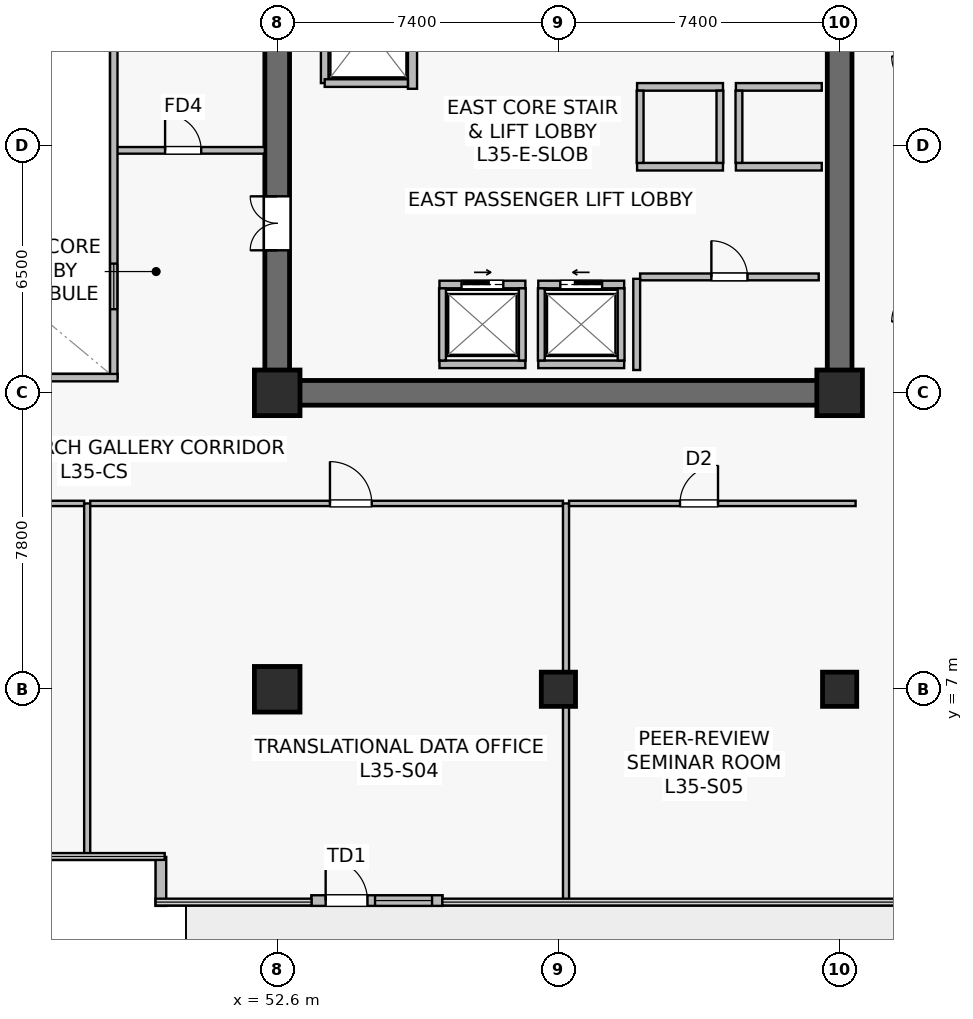
"""IFC4 building model, lengths in metres.
Left out: names, types, materials, properties, quantities, classifications, styles, units other than length and angle.
Written with IfcOpenShell. Run it as: python <this file> out.ifc"""

import sys

from ifc_helpers import new_model, si_unit, direction, frame, frame_2d, origin, origin_2d, place, context, subcontext, project, spatial, rectangle, extrude, source, transform, mapped, element, fill, save


model = new_model("IFC4")
c1 = context("Model", 3, precision=1e-05, world=origin(), true_north=direction((0.0, 1.0)))
c2 = subcontext(c1, "Body", "Model", "MODEL_VIEW")
j1 = project(units=[si_unit("LENGTHUNIT", "METRE"), si_unit("PLANEANGLEUNIT", "RADIAN")], contexts=[c1])
p1 = place(None, origin())
s1 = spatial("IfcSite", under=j1, at=p1, CompositionType="ELEMENT")
p2 = place(p1, origin())
s2 = spatial("IfcBuilding", under=s1, at=p2, CompositionType="ELEMENT")
p3 = place(p2, frame((0.0, 0.0, 146.1)))
s3 = spatial("IfcBuildingStorey", under=s2, at=p3, CompositionType="ELEMENT", Elevation=146.1)
p4 = place(p3, frame((52.275, 14.8, 0.0), z_axis=(0.0, 0.0, 1.0), x_axis=(1.0, 0.0, 0.0)))
e1 = element("IfcWall", 1, at=p4, inside=s3, PredefinedType="SHEAR", context=c2, shape_type="SweptSolid", body=[
    extrude(rectangle(XDim=15.45, YDim=0.65, at=frame_2d((7.725, 0.0))), origin(), (0.0, 0.0, 1.0), 3.79),
])
p5 = place(p3, frame((52.6, 15.125, 0.0), z_axis=(0.0, 0.0, 1.0), x_axis=(0.0, 1.0, 0.0)))
e2 = element("IfcWall", 2, at=p5, inside=s3, PredefinedType="SHEAR", context=c2, shape_type="SweptSolid", body=[
    extrude(rectangle(XDim=18.35, YDim=0.65, at=frame_2d((9.175, 0.0))), origin(), (0.0, 0.0, 1.0), 3.79),
])
p6 = place(p5, frame((3.425, 0.0, 0.0)))
e3 = element("IfcOpeningElement", 3, at=p6, cuts=e2, PredefinedType="OPENING", context=c2, shape_type="SweptSolid", body=[
    extrude(rectangle(XDim=1.42, YDim=2.2, at=frame_2d((0.71, 1.1))), frame((0.0, 0.335, 0.0), z_axis=(0.0, -1.0, 0.0), x_axis=(1.0, 0.0, 0.0)), (0.0, 0.0, 1.0), 0.67),
])
p7 = place(p3, frame((67.4, 15.125, 0.0), z_axis=(0.0, 0.0, 1.0), x_axis=(0.0, 1.0, 0.0)))
e4 = element("IfcWall", 4, at=p7, inside=s3, PredefinedType="SHEAR", context=c2, shape_type="SweptSolid", body=[
    extrude(rectangle(XDim=18.35, YDim=0.65, at=frame_2d((9.175, 0.0))), origin(), (0.0, 0.0, 1.0), 3.79),
])
m1 = source(origin(), c2, "Body", "SweptSolid", [
    extrude(rectangle(XDim=1.2, YDim=1.2, at=origin_2d()), origin(), (0.0, 0.0, 1.0), 4.1),
])
p8 = place(p3, frame((52.6, 7.0, 0.0), z_axis=(0.0, 0.0, 1.0), x_axis=(1.0, 0.0, 0.0)))
e5 = element("IfcColumn", 5, at=p8, inside=s3, PredefinedType="COLUMN", context=c2, shape_type="MappedRepresentation", body=[
    mapped(m1, transform((0.0, 0.0, 0.0), scale=1.0)),
])
m2 = source(origin(), c2, "Body", "SweptSolid", [
    extrude(rectangle(XDim=0.9, YDim=0.9, at=origin_2d()), origin(), (0.0, 0.0, 1.0), 4.1),
])
p9 = place(p3, frame((60.0, 7.0, 0.0), z_axis=(0.0, 0.0, 1.0), x_axis=(1.0, 0.0, 0.0)))
e6 = element("IfcColumn", 6, at=p9, inside=s3, PredefinedType="COLUMN", context=c2, shape_type="MappedRepresentation", body=[
    mapped(m2, transform((0.0, 0.0, 0.0), scale=1.0)),
])
for number, where, z_axis, x_axis in (
    (7, (52.6, 14.8, 0.0), (0.0, 0.0, 1.0), (1.0, 0.0, 0.0)),
    (8, (67.4, 14.8, 0.0), (0.0, 0.0, 1.0), (1.0, 0.0, 0.0)),
):
    element("IfcColumn", number, at=place(p3, frame(where, z_axis=z_axis, x_axis=x_axis)), inside=s3, PredefinedType="COLUMN", context=c2, shape_type="MappedRepresentation", body=[
        mapped(m1, transform((0.0, 0.0, 0.0), scale=1.0)),
    ])
p10 = place(p3, frame((67.4, 7.0, 0.0), z_axis=(0.0, 0.0, 1.0), x_axis=(1.0, 0.0, 0.0)))
e9 = element("IfcColumn", 9, at=p10, inside=s3, PredefinedType="COLUMN", context=c2, shape_type="MappedRepresentation", body=[
    mapped(m2, transform((0.0, 0.0, 0.0), scale=1.0)),
])
p11 = place(p3, frame((53.497, 1.44, 0.0), z_axis=(0.0, 0.0, 1.0), x_axis=(1.0, 0.0, 0.0)))
e10 = element("IfcWall", 10, at=p11, inside=s3, PredefinedType="STANDARD", context=c2, shape_type="SweptSolid", body=[
    extrude(rectangle(XDim=3.456, YDim=0.28, at=frame_2d((1.728, 0.0))), origin(), (0.0, 0.0, 1.0), 3.79),
])
p12 = place(p11, frame((0.378, 0.0, 0.0)))
e11 = element("IfcOpeningElement", 11, at=p12, cuts=e10, PredefinedType="OPENING", context=c2, shape_type="SweptSolid", body=[
    extrude(rectangle(XDim=1.1, YDim=2.2, at=frame_2d((0.55, 1.1))), frame((0.0, 0.15, 0.0), z_axis=(0.0, -1.0, 0.0), x_axis=(1.0, 0.0, 0.0)), (0.0, 0.0, 1.0), 0.3),
])
p13 = place(p11, frame((1.678, 0.0, 0.9)))
e12 = element("IfcOpeningElement", 12, at=p13, cuts=e10, PredefinedType="OPENING", context=c2, shape_type="SweptSolid", body=[
    extrude(rectangle(XDim=1.5, YDim=2.2, at=frame_2d((0.75, 1.1))), frame((0.0, 0.15, 0.0), z_axis=(0.0, -1.0, 0.0), x_axis=(1.0, 0.0, 0.0)), (0.0, 0.0, 1.0), 0.3),
])
p14 = place(p3, frame((49.54, 2.588, 0.0), z_axis=(0.0, 0.0, 1.0), x_axis=(0.0, -1.0, 0.0)))
e13 = element("IfcWall", 13, at=p14, inside=s3, PredefinedType="STANDARD", context=c2, shape_type="SweptSolid", body=[
    extrude(rectangle(XDim=1.288, YDim=0.28, at=frame_2d((0.644, 0.0))), origin(), (0.0, 0.0, 1.0), 3.79),
])
p15 = place(p3, frame((56.16, 22.8, 0.0), z_axis=(0.0, 0.0, 1.0), x_axis=(0.0, 1.0, 0.0)))
e14 = element("IfcWall", 14, at=p15, inside=s3, PredefinedType="SOLIDWALL", context=c2, shape_type="SweptSolid", body=[
    extrude(rectangle(XDim=6.85, YDim=0.24, at=frame_2d((3.425, 0.0))), origin(), (0.0, 0.0, 1.0), 2.875),
])
p16 = place(p15, frame((4.85, 0.0, 0.0)))
e15 = element("IfcOpeningElement", 15, at=p16, cuts=e14, PredefinedType="OPENING", context=c2, shape_type="SweptSolid", body=[
    extrude(rectangle(XDim=1.1, YDim=2.22, at=frame_2d((0.55, 1.11))), frame((0.0, 0.13, 0.0), z_axis=(0.0, -1.0, 0.0), x_axis=(1.0, 0.0, 0.0)), (0.0, 0.0, 1.0), 0.26),
])
p17 = place(p15, frame((1.0, 0.0, 0.0)))
e16 = element("IfcOpeningElement", 16, at=p17, cuts=e14, PredefinedType="OPENING", context=c2, shape_type="SweptSolid", body=[
    extrude(rectangle(XDim=1.2, YDim=2.22, at=frame_2d((0.6, 1.11))), frame((0.0, 0.13, 0.0), z_axis=(0.0, -1.0, 0.0), x_axis=(1.0, 0.0, 0.0)), (0.0, 0.0, 1.0), 0.26),
])
p18 = place(p3, frame((59.47, 17.65, 0.0), z_axis=(0.0, 0.0, 1.0), x_axis=(1.0, 0.0, 0.0)))
e17 = element("IfcWall", 17, at=p18, inside=s3, PredefinedType="SOLIDWALL", context=c2, shape_type="SweptSolid", body=[
    extrude(rectangle(XDim=2.26, YDim=0.2, at=frame_2d((1.13, 0.0))), origin(), (0.0, 0.0, 1.0), 3.125),
])
p19 = place(p18, frame((0.58, 0.0, 0.0)))
e18 = element("IfcOpeningElement", 18, at=p19, cuts=e17, PredefinedType="OPENING", context=c2, shape_type="SweptSolid", body=[
    extrude(rectangle(XDim=1.1, YDim=2.22, at=frame_2d((0.55, 1.11))), frame((0.0, 0.11, 0.0), z_axis=(0.0, -1.0, 0.0), x_axis=(1.0, 0.0, 0.0)), (0.0, 0.0, 1.0), 0.22),
])
p20 = place(p3, frame((59.47, 15.55, 0.0), z_axis=(0.0, 0.0, 1.0), x_axis=(1.0, 0.0, 0.0)))
e19 = element("IfcWall", 19, at=p20, inside=s3, PredefinedType="SOLIDWALL", context=c2, shape_type="SweptSolid", body=[
    extrude(rectangle(XDim=2.26, YDim=0.2, at=frame_2d((1.13, 0.0))), origin(), (0.0, 0.0, 1.0), 3.125),
])
for number, where, z_axis, x_axis in (
    (20, (59.55, 15.65, 0.0), (0.0, 0.0, 1.0), (0.0, 1.0, 0.0)),
    (21, (61.65, 15.65, 0.0), (0.0, 0.0, 1.0), (0.0, 1.0, 0.0)),
):
    element("IfcWall", number, at=place(p3, frame(where, z_axis=z_axis, x_axis=x_axis)), inside=s3, PredefinedType="SOLIDWALL", context=c2, shape_type="SweptSolid", body=[
        extrude(rectangle(XDim=1.9, YDim=0.18, at=frame_2d((0.95, 0.0))), origin(), (0.0, 0.0, 1.0), 3.79),
    ])
p21 = place(p3, frame((56.87, 17.65, 0.0), z_axis=(0.0, 0.0, 1.0), x_axis=(1.0, 0.0, 0.0)))
e22 = element("IfcWall", 22, at=p21, inside=s3, PredefinedType="SOLIDWALL", context=c2, shape_type="SweptSolid", body=[
    extrude(rectangle(XDim=2.26, YDim=0.2, at=frame_2d((1.13, 0.0))), origin(), (0.0, 0.0, 1.0), 3.79),
])
p22 = place(p21, frame((0.58, 0.0, 0.0)))
e23 = element("IfcOpeningElement", 23, at=p22, cuts=e22, PredefinedType="OPENING", context=c2, shape_type="SweptSolid", body=[
    extrude(rectangle(XDim=1.1, YDim=2.22, at=frame_2d((0.55, 1.11))), frame((0.0, 0.11, 0.0), z_axis=(0.0, -1.0, 0.0), x_axis=(1.0, 0.0, 0.0)), (0.0, 0.0, 1.0), 0.22),
])
p23 = place(p3, frame((56.87, 15.55, 0.0), z_axis=(0.0, 0.0, 1.0), x_axis=(1.0, 0.0, 0.0)))
e24 = element("IfcWall", 24, at=p23, inside=s3, PredefinedType="SOLIDWALL", context=c2, shape_type="SweptSolid", body=[
    extrude(rectangle(XDim=2.26, YDim=0.2, at=frame_2d((1.13, 0.0))), origin(), (0.0, 0.0, 1.0), 3.79),
])
for number, where, z_axis, x_axis in (
    (25, (56.95, 15.65, 0.0), (0.0, 0.0, 1.0), (0.0, 1.0, 0.0)),
    (26, (59.05, 15.65, 0.0), (0.0, 0.0, 1.0), (0.0, 1.0, 0.0)),
):
    element("IfcWall", number, at=place(p3, frame(where, z_axis=z_axis, x_axis=x_axis)), inside=s3, PredefinedType="SOLIDWALL", context=c2, shape_type="SweptSolid", body=[
        extrude(rectangle(XDim=1.9, YDim=0.18, at=frame_2d((0.95, 0.0))), origin(), (0.0, 0.0, 1.0), 3.79),
    ])
for number, where, z_axis, x_axis in (
    (27, (64.67, 20.75, 0.0), (0.0, 0.0, 1.0), (1.0, 0.0, 0.0)),
    (28, (64.67, 22.85, 0.0), (0.0, 0.0, 1.0), (1.0, 0.0, 0.0)),
):
    element("IfcWall", number, at=place(p3, frame(where, z_axis=z_axis, x_axis=x_axis)), inside=s3, PredefinedType="SOLIDWALL", context=c2, shape_type="SweptSolid", body=[
        extrude(rectangle(XDim=2.26, YDim=0.2, at=frame_2d((1.13, 0.0))), origin(), (0.0, 0.0, 1.0), 3.79),
    ])
p24 = place(p3, frame((64.75, 20.85, 0.0), z_axis=(0.0, 0.0, 1.0), x_axis=(0.0, 1.0, 0.0)))
e29 = element("IfcWall", 29, at=p24, inside=s3, PredefinedType="SOLIDWALL", context=c2, shape_type="SweptSolid", body=[
    extrude(rectangle(XDim=1.9, YDim=0.18, at=frame_2d((0.95, 0.0))), origin(), (0.0, 0.0, 1.0), 3.79),
])
for number, where, z_axis, x_axis in (
    (30, (62.07, 20.75, 0.0), (0.0, 0.0, 1.0), (1.0, 0.0, 0.0)),
    (31, (62.07, 22.85, 0.0), (0.0, 0.0, 1.0), (1.0, 0.0, 0.0)),
):
    element("IfcWall", number, at=place(p3, frame(where, z_axis=z_axis, x_axis=x_axis)), inside=s3, PredefinedType="SOLIDWALL", context=c2, shape_type="SweptSolid", body=[
        extrude(rectangle(XDim=2.26, YDim=0.2, at=frame_2d((1.13, 0.0))), origin(), (0.0, 0.0, 1.0), 3.79),
    ])
for number, where, z_axis, x_axis in (
    (32, (62.15, 20.85, 0.0), (0.0, 0.0, 1.0), (0.0, 1.0, 0.0)),
    (33, (64.25, 20.85, 0.0), (0.0, 0.0, 1.0), (0.0, 1.0, 0.0)),
):
    element("IfcWall", number, at=place(p3, frame(where, z_axis=z_axis, x_axis=x_axis)), inside=s3, PredefinedType="SOLIDWALL", context=c2, shape_type="SweptSolid", body=[
        extrude(rectangle(XDim=1.9, YDim=0.18, at=frame_2d((0.95, 0.0))), origin(), (0.0, 0.0, 1.0), 3.79),
    ])
p25 = place(p3, frame((53.85, 22.95, 0.0), z_axis=(0.0, 0.0, 1.0), x_axis=(0.0, 1.0, 0.0)))
e34 = element("IfcWall", 34, at=p25, inside=s3, PredefinedType="SOLIDWALL", context=c2, shape_type="SweptSolid", body=[
    extrude(rectangle(XDim=2.9, YDim=0.2, at=frame_2d((1.45, 0.0))), origin(), (0.0, 0.0, 1.0), 2.875),
])
p26 = place(p3, frame((53.85, 22.95, 0.0), z_axis=(0.0, 0.0, 1.0), x_axis=(1.0, 0.0, 0.0)))
e35 = element("IfcWall", 35, at=p26, inside=s3, PredefinedType="SOLIDWALL", context=c2, shape_type="SweptSolid", body=[
    extrude(rectangle(XDim=2.19, YDim=0.2, at=frame_2d((1.095, 0.0))), origin(), (0.0, 0.0, 1.0), 3.79),
])
p27 = place(p3, frame((62.15, 17.85, 0.0), z_axis=(0.0, 0.0, 1.0), x_axis=(1.0, 0.0, 0.0)))
e36 = element("IfcWall", 36, at=p27, inside=s3, PredefinedType="SOLIDWALL", context=c2, shape_type="SweptSolid", body=[
    extrude(rectangle(XDim=4.7, YDim=0.18, at=frame_2d((2.35, 0.0))), origin(), (0.0, 0.0, 1.0), 3.79),
])
p28 = place(p27, frame((1.875, 0.0, 0.0)))
e37 = element("IfcOpeningElement", 37, at=p28, cuts=e36, PredefinedType="OPENING", context=c2, shape_type="SweptSolid", body=[
    extrude(rectangle(XDim=0.95, YDim=2.15, at=frame_2d((0.475, 1.075))), frame((0.0, 0.1, 0.0), z_axis=(0.0, -1.0, 0.0), x_axis=(1.0, 0.0, 0.0)), (0.0, 0.0, 1.0), 0.2),
])
p29 = place(p3, frame((62.06, 15.4, 0.0), z_axis=(0.0, 0.0, 1.0), x_axis=(0.0, 1.0, 0.0)))
e38 = element("IfcWall", 38, at=p29, inside=s3, PredefinedType="SOLIDWALL", context=c2, shape_type="SweptSolid", body=[
    extrude(rectangle(XDim=2.4, YDim=0.18, at=frame_2d((1.2, 0.0))), origin(), (0.0, 0.0, 1.0), 3.79),
])
p30 = place(p3, frame((48.3, 21.18, 0.0), z_axis=(0.0, 0.0, 1.0), x_axis=(1.0, 0.0, 0.0)))
e39 = element("IfcWall", 39, at=p30, inside=s3, PredefinedType="PARTITIONING", context=c2, shape_type="SweptSolid", body=[
    extrude(rectangle(XDim=3.975, YDim=0.175, at=frame_2d((1.987, 0.0))), origin(), (0.0, 0.0, 1.0), 3.79),
])
p31 = place(p30, frame((1.35, 0.0, 0.0)))
e40 = element("IfcOpeningElement", 40, at=p31, cuts=e39, PredefinedType="OPENING", context=c2, shape_type="SweptSolid", body=[
    extrude(rectangle(XDim=0.95, YDim=2.15, at=frame_2d((0.475, 1.075))), frame((0.0, 0.098, 0.0), z_axis=(0.0, -1.0, 0.0), x_axis=(1.0, 0.0, 0.0)), (0.0, 0.0, 1.0), 0.195),
])
p32 = place(p3, frame((48.3, 15.2, 0.0), z_axis=(0.0, 0.0, 1.0), x_axis=(0.0, 1.0, 0.0)))
e41 = element("IfcWall", 41, at=p32, inside=s3, PredefinedType="SOLIDWALL", context=c2, shape_type="SweptSolid", body=[
    extrude(rectangle(XDim=18.2, YDim=0.195, at=frame_2d((9.1, 0.0))), origin(), (0.0, 0.0, 1.0), 3.79),
])
p33 = place(p32, frame((1.8, 0.0, 0.9)))
e42 = element("IfcOpeningElement", 42, at=p33, cuts=e41, PredefinedType="OPENING", context=c2, shape_type="SweptSolid", body=[
    extrude(rectangle(XDim=1.2, YDim=1.35, at=frame_2d((0.6, 0.675))), frame((0.0, 0.107, 0.0), z_axis=(0.0, -1.0, 0.0), x_axis=(1.0, 0.0, 0.0)), (0.0, 0.0, 1.0), 0.215),
])
p34 = place(p32, frame((13.2, 0.0, 0.9)))
e43 = element("IfcOpeningElement", 43, at=p34, cuts=e41, PredefinedType="OPENING", context=c2, shape_type="SweptSolid", body=[
    extrude(rectangle(XDim=1.2, YDim=1.35, at=frame_2d((0.6, 0.675))), frame((0.0, 0.107, 0.0), z_axis=(0.0, -1.0, 0.0), x_axis=(1.0, 0.0, 0.0)), (0.0, 0.0, 1.0), 0.215),
])
p35 = place(p3, frame((26.4, 15.2, 0.0), z_axis=(0.0, 0.0, 1.0), x_axis=(1.0, 0.0, 0.0)))
e44 = element("IfcWall", 44, at=p35, inside=s3, PredefinedType="SOLIDWALL", context=c2, shape_type="SweptSolid", body=[
    extrude(rectangle(XDim=22.0, YDim=0.195, at=frame_2d((11.0, 0.0))), origin(), (0.0, 0.0, 1.0), 3.79),
])
p36 = place(p3, frame((32.48, 11.89, 0.0), z_axis=(0.0, 0.0, 1.0), x_axis=(1.0, 0.0, 0.0)))
e45 = element("IfcWall", 45, at=p36, inside=s3, PredefinedType="PARTITIONING", context=c2, shape_type="SweptSolid", body=[
    extrude(rectangle(XDim=15.04, YDim=0.14, at=frame_2d((7.52, 0.0))), origin(), (0.0, 0.0, 1.0), 3.125),
])
p37 = place(p36, frame((6.176, 0.0, 0.0)))
e46 = element("IfcOpeningElement", 46, at=p37, cuts=e45, PredefinedType="OPENING", context=c2, shape_type="SweptSolid", body=[
    extrude(rectangle(XDim=1.1, YDim=2.18, at=frame_2d((0.55, 1.09))), frame((0.0, 0.08, 0.0), z_axis=(0.0, -1.0, 0.0), x_axis=(1.0, 0.0, 0.0)), (0.0, 0.0, 1.0), 0.16),
])
p38 = place(p3, frame((47.6, 2.61, 0.0), z_axis=(0.0, 0.0, 1.0), x_axis=(0.0, 1.0, 0.0)))
e47 = element("IfcWall", 47, at=p38, inside=s3, PredefinedType="PARTITIONING", context=c2, shape_type="SweptSolid", body=[
    extrude(rectangle(XDim=9.28, YDim=0.16, at=frame_2d((4.64, 0.0))), origin(), (0.0, 0.0, 1.0), 3.075),
])
p39 = place(p3, frame((47.68, 11.89, 0.0), z_axis=(0.0, 0.0, 1.0), x_axis=(1.0, 0.0, 0.0)))
e48 = element("IfcWall", 48, at=p39, inside=s3, PredefinedType="PARTITIONING", context=c2, shape_type="SweptSolid", body=[
    extrude(rectangle(XDim=12.44, YDim=0.14, at=frame_2d((6.22, 0.0))), origin(), (0.0, 0.0, 1.0), 3.125),
])
p40 = place(p39, frame((6.308, 0.0, 0.0)))
e49 = element("IfcOpeningElement", 49, at=p40, cuts=e48, PredefinedType="OPENING", context=c2, shape_type="SweptSolid", body=[
    extrude(rectangle(XDim=1.1, YDim=2.18, at=frame_2d((0.55, 1.09))), frame((0.0, 0.08, 0.0), z_axis=(0.0, -1.0, 0.0), x_axis=(1.0, 0.0, 0.0)), (0.0, 0.0, 1.0), 0.16),
])
p41 = place(p3, frame((60.2, 1.41, 0.0), z_axis=(0.0, 0.0, 1.0), x_axis=(0.0, 1.0, 0.0)))
e50 = element("IfcWall", 50, at=p41, inside=s3, PredefinedType="PARTITIONING", context=c2, shape_type="SweptSolid", body=[
    extrude(rectangle(XDim=10.48, YDim=0.16, at=frame_2d((5.24, 0.0))), origin(), (0.0, 0.0, 1.0), 3.075),
])
p42 = place(p3, frame((60.28, 11.89, 0.0), z_axis=(0.0, 0.0, 1.0), x_axis=(1.0, 0.0, 0.0)))
e51 = element("IfcWall", 51, at=p42, inside=s3, PredefinedType="PARTITIONING", context=c2, shape_type="SweptSolid", body=[
    extrude(rectangle(XDim=7.54, YDim=0.14, at=frame_2d((3.77, 0.0))), origin(), (0.0, 0.0, 1.0), 3.275),
])
p43 = place(p42, frame((2.92, 0.0, 0.0)))
e52 = element("IfcOpeningElement", 52, at=p43, cuts=e51, PredefinedType="OPENING", context=c2, shape_type="SweptSolid", body=[
    extrude(rectangle(XDim=1.0, YDim=2.15, at=frame_2d((0.5, 1.075))), frame((0.0, 0.08, 0.0), z_axis=(0.0, -1.0, 0.0), x_axis=(1.0, 0.0, 0.0)), (0.0, 0.0, 1.0), 0.16),
])
m3 = source(origin(), c2, "Body", "SweptSolid", [
    extrude(rectangle(XDim=1.1, YDim=2.2, at=frame_2d((0.55, 1.1))), frame((0.0, 0.025, 0.0), z_axis=(0.0, -1.0, 0.0), x_axis=(1.0, 0.0, 0.0)), (0.0, 0.0, 1.0), 0.05),
])
p44 = place(p12, origin())
e53 = element("IfcDoor", 53, at=p44, inside=s3, OperationType="SINGLE_SWING_LEFT", PredefinedType="DOOR", context=c2, shape_type="MappedRepresentation", body=[
    mapped(m3, transform((0.0, 0.0, 0.0), scale=1.0)),
])
fill(e11, e53)
m4 = source(origin(), c2, "Body", "SweptSolid", [
    extrude(rectangle(XDim=1.5, YDim=2.2, at=frame_2d((0.75, 1.1))), frame((0.0, 0.03, 0.0), z_axis=(0.0, -1.0, 0.0), x_axis=(1.0, 0.0, 0.0)), (0.0, 0.0, 1.0), 0.06),
])
p45 = place(p13, origin())
e54 = element("IfcWindow", 54, at=p45, inside=s3, PartitioningType="SINGLE_PANEL", PredefinedType="WINDOW", context=c2, shape_type="MappedRepresentation", body=[
    mapped(m4, transform((0.0, 0.0, 0.0), scale=1.0)),
])
fill(e12, e54)
m5 = source(origin(), c2, "Body", "SweptSolid", [
    extrude(rectangle(XDim=1.2, YDim=1.35, at=frame_2d((0.6, 0.675))), frame((0.0, 0.03, 0.0), z_axis=(0.0, -1.0, 0.0), x_axis=(1.0, 0.0, 0.0)), (0.0, 0.0, 1.0), 0.06),
])
p46 = place(p33, origin())
e55 = element("IfcWindow", 55, at=p46, inside=s3, PartitioningType="SINGLE_PANEL", PredefinedType="WINDOW", context=c2, shape_type="MappedRepresentation", body=[
    mapped(m5, transform((0.0, 0.0, 0.0), scale=1.0)),
])
fill(e42, e55)
m6 = source(origin(), c2, "Body", "SweptSolid", [
    extrude(rectangle(XDim=1.1, YDim=2.22, at=frame_2d((0.55, 1.11))), frame((0.0, 0.025, 0.0), z_axis=(0.0, -1.0, 0.0), x_axis=(1.0, 0.0, 0.0)), (0.0, 0.0, 1.0), 0.05),
])
p47 = place(p19, origin())
e56 = element("IfcDoor", 56, at=p47, inside=s3, OperationType="SLIDING_TO_LEFT", PredefinedType="USERDEFINED", context=c2, shape_type="MappedRepresentation", body=[
    mapped(m6, transform((0.0, 0.0, 0.0), scale=1.0)),
])
fill(e18, e56)
p48 = place(p22, origin())
e57 = element("IfcDoor", 57, at=p48, inside=s3, OperationType="SLIDING_TO_RIGHT", PredefinedType="USERDEFINED", context=c2, shape_type="MappedRepresentation", body=[
    mapped(m6, transform((0.0, 0.0, 0.0), scale=1.0)),
])
fill(e23, e57)
m7 = source(origin(), c2, "Body", "SweptSolid", [
    extrude(rectangle(XDim=0.95, YDim=2.15, at=frame_2d((0.475, 1.075))), frame((0.0, 0.025, 0.0), z_axis=(0.0, -1.0, 0.0), x_axis=(1.0, 0.0, 0.0)), (0.0, 0.0, 1.0), 0.05),
])
p49 = place(p28, origin())
e58 = element("IfcDoor", 58, at=p49, inside=s3, OperationType="SINGLE_SWING_LEFT", PredefinedType="DOOR", context=c2, shape_type="MappedRepresentation", body=[
    mapped(m7, transform((0.0, 0.0, 0.0), scale=1.0)),
])
fill(e37, e58)
m8 = source(origin(), c2, "Body", "SweptSolid", [
    extrude(rectangle(XDim=1.42, YDim=2.2, at=frame_2d((0.71, 1.1))), frame((0.0, 0.025, 0.0), z_axis=(0.0, -1.0, 0.0), x_axis=(1.0, 0.0, 0.0)), (0.0, 0.0, 1.0), 0.05),
])
p50 = place(p6, origin())
e59 = element("IfcDoor", 59, at=p50, inside=s3, OperationType="DOUBLE_DOOR_SINGLE_SWING", PredefinedType="DOOR", context=c2, shape_type="MappedRepresentation", body=[
    mapped(m8, transform((0.0, 0.0, 0.0), scale=1.0)),
])
fill(e3, e59)
p51 = place(p31, origin())
e60 = element("IfcDoor", 60, at=p51, inside=s3, OperationType="SINGLE_SWING_LEFT", PredefinedType="DOOR", context=c2, shape_type="MappedRepresentation", body=[
    mapped(m7, transform((0.0, 0.0, 0.0), scale=1.0)),
])
fill(e40, e60)
m9 = source(origin(), c2, "Body", "SweptSolid", [
    extrude(rectangle(XDim=1.1, YDim=2.18, at=frame_2d((0.55, 1.09))), frame((0.0, 0.025, 0.0), z_axis=(0.0, -1.0, 0.0), x_axis=(1.0, 0.0, 0.0)), (0.0, 0.0, 1.0), 0.05),
])
p52 = place(p40, origin())
e61 = element("IfcDoor", 61, at=p52, inside=s3, OperationType="SINGLE_SWING_LEFT", PredefinedType="DOOR", context=c2, shape_type="MappedRepresentation", body=[
    mapped(m9, transform((0.0, 0.0, 0.0), scale=1.0)),
])
fill(e49, e61)
m10 = source(origin(), c2, "Body", "SweptSolid", [
    extrude(rectangle(XDim=1.0, YDim=2.15, at=frame_2d((0.5, 1.075))), frame((0.0, 0.025, 0.0), z_axis=(0.0, -1.0, 0.0), x_axis=(1.0, 0.0, 0.0)), (0.0, 0.0, 1.0), 0.05),
])
p53 = place(p43, origin())
e62 = element("IfcDoor", 62, at=p53, inside=s3, OperationType="SINGLE_SWING_RIGHT", PredefinedType="DOOR", context=c2, shape_type="MappedRepresentation", body=[
    mapped(m10, transform((0.0, 0.0, 0.0), scale=1.0)),
])
fill(e52, e62)
save(model, sys.argv[1])
